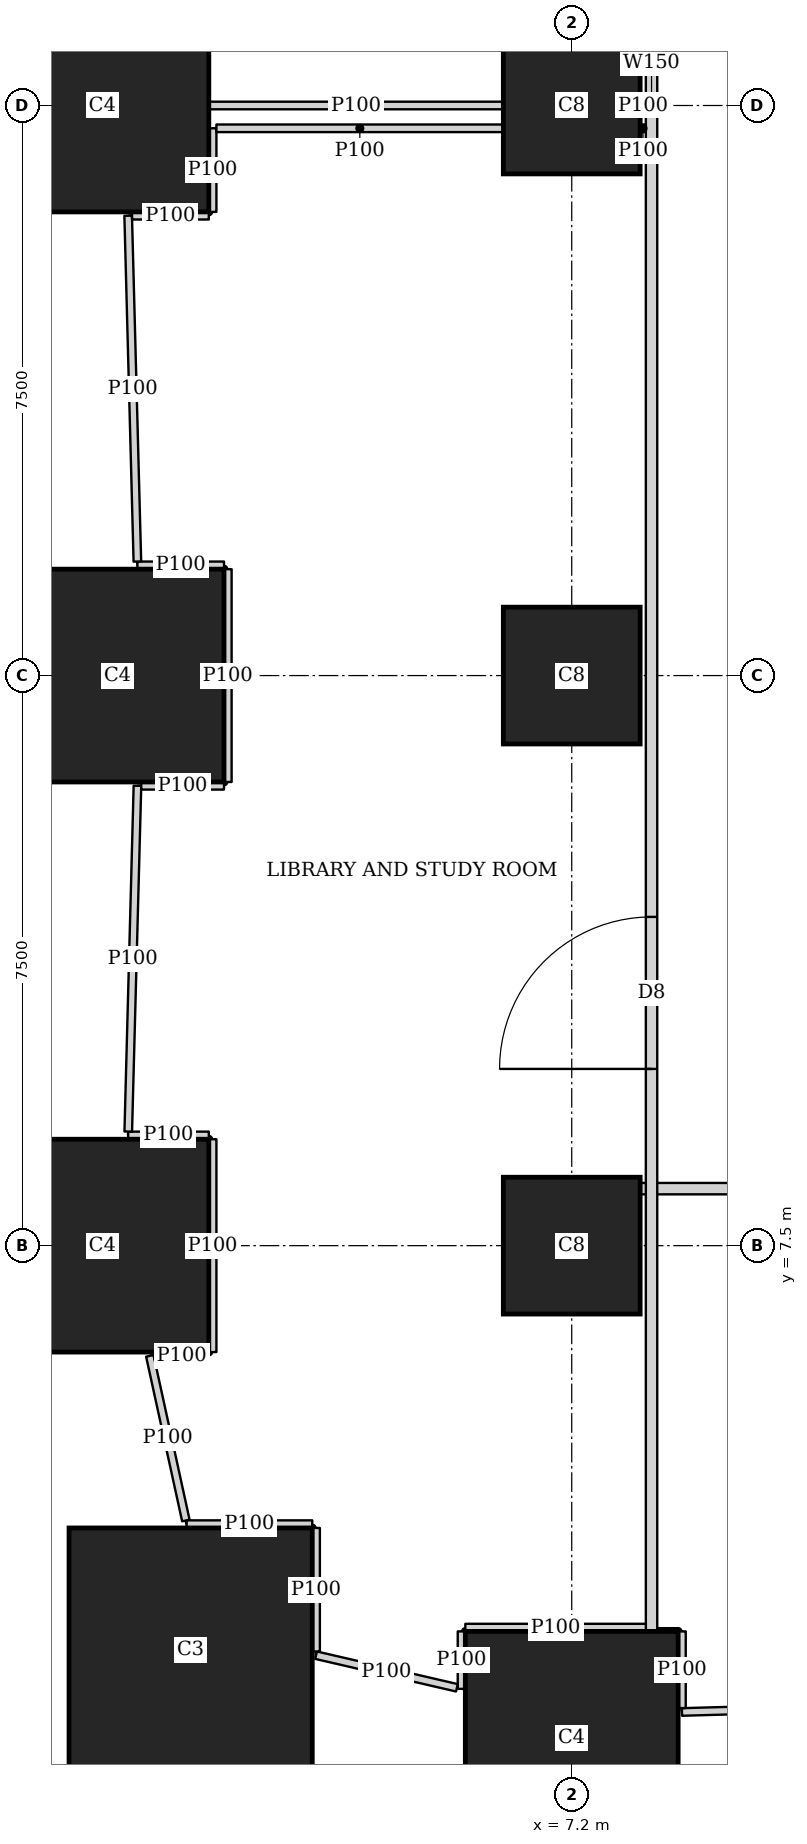
"""IFC4 building model, lengths in metres.
Left out: names, types, materials, properties, quantities, classifications, styles, units other than length and angle.
Written with IfcOpenShell. Run it as: python <this file> out.ifc"""

import sys

from ifc_helpers import new_model, si_unit, direction, frame, frame_2d, origin, origin_2d, place, context, subcontext, project, spatial, rectangle, extrude, element, fill, save


model = new_model("IFC4")
c1 = context("Model", 3, precision=1e-05, world=origin(), true_north=direction((0.0, 1.0)))
c2 = subcontext(c1, "Body", "Model", "MODEL_VIEW")
j1 = project(units=[si_unit("LENGTHUNIT", "METRE"), si_unit("PLANEANGLEUNIT", "RADIAN")], contexts=[c1])
p1 = place(None, origin())
s1 = spatial("IfcSite", under=j1, at=p1, CompositionType="ELEMENT")
p2 = place(p1, origin())
s2 = spatial("IfcBuilding", under=s1, at=p2, CompositionType="ELEMENT")
p3 = place(p2, frame((0.0, 0.0, 72.5)))
s3 = spatial("IfcBuildingStorey", under=s2, at=p3, CompositionType="ELEMENT", Elevation=72.5)
p4 = place(p3, frame((7.2, 1.025, 0.0), z_axis=(0.0, 0.0, 1.0), x_axis=(1.0, 0.0, 0.0)))
e1 = element("IfcColumn", 1, at=p4, inside=s3, PredefinedType="COLUMN", context=c2, shape_type="SweptSolid", body=[
    extrude(rectangle(XDim=2.8, YDim=2.8, at=origin_2d()), origin(), (0.0, 0.0, 1.0), 5.4),
])
p5 = place(p3, frame((2.186, 2.186, 0.0), z_axis=(0.0, 0.0, 1.0), x_axis=(1.0, 0.0, 0.0)))
e2 = element("IfcColumn", 2, at=p5, inside=s3, PredefinedType="COLUMN", context=c2, shape_type="SweptSolid", body=[
    extrude(rectangle(XDim=3.2, YDim=3.2, at=origin_2d()), origin(), (0.0, 0.0, 1.0), 5.4),
])
p6 = place(p3, frame((1.025, 7.5, 0.0), z_axis=(0.0, 0.0, 1.0), x_axis=(1.0, 0.0, 0.0)))
e3 = element("IfcColumn", 3, at=p6, inside=s3, PredefinedType="COLUMN", context=c2, shape_type="SweptSolid", body=[
    extrude(rectangle(XDim=2.8, YDim=2.8, at=origin_2d()), origin(), (0.0, 0.0, 1.0), 5.4),
])
p7 = place(p3, frame((7.2, 7.5, 0.0), z_axis=(0.0, 0.0, 1.0), x_axis=(1.0, 0.0, 0.0)))
e4 = element("IfcColumn", 4, at=p7, inside=s3, PredefinedType="COLUMN", context=c2, shape_type="SweptSolid", body=[
    extrude(rectangle(XDim=1.8, YDim=1.8, at=origin_2d()), origin(), (0.0, 0.0, 1.0), 5.4),
])
p8 = place(p3, frame((1.225, 15.0, 0.0), z_axis=(0.0, 0.0, 1.0), x_axis=(1.0, 0.0, 0.0)))
e5 = element("IfcColumn", 5, at=p8, inside=s3, PredefinedType="COLUMN", context=c2, shape_type="SweptSolid", body=[
    extrude(rectangle(XDim=2.8, YDim=2.8, at=origin_2d()), origin(), (0.0, 0.0, 1.0), 5.4),
])
p9 = place(p3, frame((7.2, 15.0, 0.0), z_axis=(0.0, 0.0, 1.0), x_axis=(1.0, 0.0, 0.0)))
e6 = element("IfcColumn", 6, at=p9, inside=s3, PredefinedType="COLUMN", context=c2, shape_type="SweptSolid", body=[
    extrude(rectangle(XDim=1.8, YDim=1.8, at=origin_2d()), origin(), (0.0, 0.0, 1.0), 5.4),
])
p10 = place(p3, frame((1.025, 22.5, 0.0), z_axis=(0.0, 0.0, 1.0), x_axis=(1.0, 0.0, 0.0)))
e7 = element("IfcColumn", 7, at=p10, inside=s3, PredefinedType="COLUMN", context=c2, shape_type="SweptSolid", body=[
    extrude(rectangle(XDim=2.8, YDim=2.8, at=origin_2d()), origin(), (0.0, 0.0, 1.0), 5.4),
])
p11 = place(p3, frame((7.2, 22.5, 0.0), z_axis=(0.0, 0.0, 1.0), x_axis=(1.0, 0.0, 0.0)))
e8 = element("IfcColumn", 8, at=p11, inside=s3, PredefinedType="COLUMN", context=c2, shape_type="SweptSolid", body=[
    extrude(rectangle(XDim=1.8, YDim=1.8, at=origin_2d()), origin(), (0.0, 0.0, 1.0), 5.4),
])
p12 = place(p3, frame((-0.358, 0.702, 0.0), z_axis=(0.0, 0.0, 1.0), x_axis=(0.707106781187, -0.707106781187, 0.0)))
e9 = element("IfcWall", 9, at=p12, inside=s3, PredefinedType="SOLIDWALL", context=c2, shape_type="SweptSolid", body=[
    extrude(rectangle(XDim=1.499, YDim=0.2, at=frame_2d((0.75, 0.0))), origin(), (0.0, 0.0, 1.0), 5.15),
])
p13 = place(p3, frame((8.25, 2.426, 0.0), z_axis=(0.0, 0.0, 1.0), x_axis=(0.0, 1.0, 0.0)))
e10 = element("IfcWall", 10, at=p13, inside=s3, PredefinedType="SOLIDWALL", context=c2, shape_type="SweptSolid", body=[
    extrude(rectangle(XDim=40.173, YDim=0.15, at=frame_2d((20.086, 0.0))), origin(), (0.0, 0.0, 1.0), 3.55),
])
p14 = place(p13, frame((7.399, 0.0, 0.0)))
e11 = element("IfcOpeningElement", 11, at=p14, cuts=e10, PredefinedType="OPENING", context=c2, shape_type="SweptSolid", body=[
    extrude(rectangle(XDim=2.0, YDim=2.1, at=frame_2d((1.0, 1.05))), frame((0.0, 0.085, 0.0), z_axis=(0.0, -1.0, 0.0), x_axis=(1.0, 0.0, 0.0)), (0.0, 0.0, 1.0), 0.17),
])
p15 = place(p13, frame((31.249, 0.0, 0.0)))
e12 = element("IfcOpeningElement", 12, at=p15, cuts=e10, PredefinedType="OPENING", context=c2, shape_type="SweptSolid", body=[
    extrude(rectangle(XDim=1.0, YDim=2.1, at=frame_2d((0.5, 1.05))), frame((0.0, 0.085, 0.0), z_axis=(0.0, -1.0, 0.0), x_axis=(1.0, 0.0, 0.0)), (0.0, 0.0, 1.0), 0.17),
])
p16 = place(p3, frame((13.499, 8.25, 0.0), z_axis=(0.0, 0.0, 1.0), x_axis=(-1.0, 0.0, 0.0)))
e13 = element("IfcWall", 13, at=p16, inside=s3, PredefinedType="SOLIDWALL", context=c2, shape_type="SweptSolid", body=[
    extrude(rectangle(XDim=5.399, YDim=0.15, at=frame_2d((2.699, 0.0))), origin(), (0.0, 0.0, 1.0), 3.55),
])
p17 = place(p3, frame((2.426, 22.5, 0.0), z_axis=(0.0, 0.0, 1.0), x_axis=(1.0, 0.0, 0.0)))
e14 = element("IfcWall", 14, at=p17, inside=s3, PredefinedType="PARTITIONING", context=c2, shape_type="SweptSolid", body=[
    extrude(rectangle(XDim=3.873, YDim=0.1, at=frame_2d((1.937, 0.0))), origin(), (0.0, 0.0, 1.0), 3.55),
])
p18 = place(p3, frame((8.101, 22.5, 0.0), z_axis=(0.0, 0.0, 1.0), x_axis=(1.0, 0.0, 0.0)))
e15 = element("IfcWall", 15, at=p18, inside=s3, PredefinedType="PARTITIONING", context=c2, shape_type="SweptSolid", body=[
    extrude(rectangle(XDim=0.074, YDim=0.1, at=frame_2d((0.037, 0.0))), origin(), (0.0, 0.0, 1.0), 3.55),
])
p19 = place(p3, frame((12.9, 1.484, 0.0), z_axis=(0.0, 0.0, 1.0), x_axis=(-0.999608911234, -0.027964702423, 0.0)))
e16 = element("IfcWall", 16, at=p19, inside=s3, PredefinedType="PARTITIONING", context=c2, shape_type="SweptSolid", body=[
    extrude(rectangle(XDim=4.252, YDim=0.1, at=frame_2d((2.126, 0.0))), origin(), (0.0, 0.0, 1.0), 3.35),
])
p20 = place(p3, frame((8.65, 1.416, 0.0), z_axis=(0.0, 0.0, 1.0), x_axis=(0.0, 1.0, 0.0)))
e17 = element("IfcWall", 17, at=p20, inside=s3, PredefinedType="PARTITIONING", context=c2, shape_type="SweptSolid", body=[
    extrude(rectangle(XDim=1.009, YDim=0.1, at=frame_2d((0.504, 0.0))), origin(), (0.0, 0.0, 1.0), 3.35),
])
p21 = place(p3, frame((8.175, 2.475, 0.0), z_axis=(0.0, 0.0, 1.0), x_axis=(-1.0, 0.0, 0.0)))
e18 = element("IfcWall", 18, at=p21, inside=s3, PredefinedType="PARTITIONING", context=c2, shape_type="SweptSolid", body=[
    extrude(rectangle(XDim=2.375, YDim=0.1, at=frame_2d((1.188, 0.0))), origin(), (0.0, 0.0, 1.0), 3.35),
])
p22 = place(p3, frame((5.75, 2.425, 0.0), z_axis=(0.0, 0.0, 1.0), x_axis=(0.0, -1.0, 0.0)))
e19 = element("IfcWall", 19, at=p22, inside=s3, PredefinedType="PARTITIONING", context=c2, shape_type="SweptSolid", body=[
    extrude(rectangle(XDim=0.756, YDim=0.1, at=frame_2d((0.378, 0.0))), origin(), (0.0, 0.0, 1.0), 3.35),
])
p23 = place(p3, frame((5.689, 1.683, 0.0), z_axis=(0.0, 0.0, 1.0), x_axis=(-0.974237371414, 0.225525041051, 0.0)))
e20 = element("IfcWall", 20, at=p23, inside=s3, PredefinedType="PARTITIONING", context=c2, shape_type="SweptSolid", body=[
    extrude(rectangle(XDim=1.902, YDim=0.1, at=frame_2d((0.951, 0.0))), origin(), (0.0, 0.0, 1.0), 3.35),
])
p24 = place(p3, frame((3.836, 2.161, 0.0), z_axis=(0.0, 0.0, 1.0), x_axis=(0.0, 1.0, 0.0)))
e21 = element("IfcWall", 21, at=p24, inside=s3, PredefinedType="PARTITIONING", context=c2, shape_type="SweptSolid", body=[
    extrude(rectangle(XDim=1.625, YDim=0.1, at=frame_2d((0.812, 0.0))), origin(), (0.0, 0.0, 1.0), 3.35),
])
p25 = place(p3, frame((3.786, 3.836, 0.0), z_axis=(0.0, 0.0, 1.0), x_axis=(-1.0, 0.0, 0.0)))
e22 = element("IfcWall", 22, at=p25, inside=s3, PredefinedType="PARTITIONING", context=c2, shape_type="SweptSolid", body=[
    extrude(rectangle(XDim=1.653, YDim=0.1, at=frame_2d((0.826, 0.0))), origin(), (0.0, 0.0, 1.0), 3.35),
])
p26 = place(p3, frame((2.123, 3.884, 0.0), z_axis=(0.0, 0.0, 1.0), x_axis=(-0.213828225657, 0.97687127602, 0.0)))
e23 = element("IfcWall", 23, at=p26, inside=s3, PredefinedType="PARTITIONING", context=c2, shape_type="SweptSolid", body=[
    extrude(rectangle(XDim=2.217, YDim=0.1, at=frame_2d((1.109, 0.0))), origin(), (0.0, 0.0, 1.0), 3.35),
])
p27 = place(p3, frame((1.711, 6.05, 0.0), z_axis=(0.0, 0.0, 1.0), x_axis=(1.0, 0.0, 0.0)))
e24 = element("IfcWall", 24, at=p27, inside=s3, PredefinedType="PARTITIONING", context=c2, shape_type="SweptSolid", body=[
    extrude(rectangle(XDim=0.714, YDim=0.1, at=frame_2d((0.357, 0.0))), origin(), (0.0, 0.0, 1.0), 3.35),
])
p28 = place(p3, frame((2.475, 6.1, 0.0), z_axis=(0.0, 0.0, 1.0), x_axis=(0.0, 1.0, 0.0)))
e25 = element("IfcWall", 25, at=p28, inside=s3, PredefinedType="PARTITIONING", context=c2, shape_type="SweptSolid", body=[
    extrude(rectangle(XDim=2.8, YDim=0.1, at=frame_2d((1.4, 0.0))), origin(), (0.0, 0.0, 1.0), 3.35),
])
p29 = place(p3, frame((2.425, 8.95, 0.0), z_axis=(0.0, 0.0, 1.0), x_axis=(-1.0, 0.0, 0.0)))
e26 = element("IfcWall", 26, at=p29, inside=s3, PredefinedType="PARTITIONING", context=c2, shape_type="SweptSolid", body=[
    extrude(rectangle(XDim=1.061, YDim=0.1, at=frame_2d((0.531, 0.0))), origin(), (0.0, 0.0, 1.0), 3.35),
])
p30 = place(p3, frame((1.365, 9.001, 0.0), z_axis=(0.0, 0.0, 1.0), x_axis=(0.026610012446, 0.999645890922, 0.0)))
e27 = element("IfcWall", 27, at=p30, inside=s3, PredefinedType="PARTITIONING", context=c2, shape_type="SweptSolid", body=[
    extrude(rectangle(XDim=4.551, YDim=0.1, at=frame_2d((2.275, 0.0))), origin(), (0.0, 0.0, 1.0), 3.35),
])
p31 = place(p3, frame((1.536, 13.55, 0.0), z_axis=(0.0, 0.0, 1.0), x_axis=(1.0, 0.0, 0.0)))
e28 = element("IfcWall", 28, at=p31, inside=s3, PredefinedType="PARTITIONING", context=c2, shape_type="SweptSolid", body=[
    extrude(rectangle(XDim=1.089, YDim=0.1, at=frame_2d((0.544, 0.0))), origin(), (0.0, 0.0, 1.0), 3.35),
])
p32 = place(p3, frame((2.675, 13.6, 0.0), z_axis=(0.0, 0.0, 1.0), x_axis=(0.0, 1.0, 0.0)))
e29 = element("IfcWall", 29, at=p32, inside=s3, PredefinedType="PARTITIONING", context=c2, shape_type="SweptSolid", body=[
    extrude(rectangle(XDim=2.8, YDim=0.1, at=frame_2d((1.4, 0.0))), origin(), (0.0, 0.0, 1.0), 3.55),
])
p33 = place(p3, frame((2.625, 16.45, 0.0), z_axis=(0.0, 0.0, 1.0), x_axis=(-1.0, 0.0, 0.0)))
e30 = element("IfcWall", 30, at=p33, inside=s3, PredefinedType="PARTITIONING", context=c2, shape_type="SweptSolid", body=[
    extrude(rectangle(XDim=1.139, YDim=0.1, at=frame_2d((0.569, 0.0))), origin(), (0.0, 0.0, 1.0), 3.35),
])
p34 = place(p3, frame((1.485, 16.5, 0.0), z_axis=(0.0, 0.0, 1.0), x_axis=(-0.026604305266, 0.999646042828, 0.0)))
e31 = element("IfcWall", 31, at=p34, inside=s3, PredefinedType="PARTITIONING", context=c2, shape_type="SweptSolid", body=[
    extrude(rectangle(XDim=4.552, YDim=0.1, at=frame_2d((2.276, 0.0))), origin(), (0.0, 0.0, 1.0), 3.35),
])
p35 = place(p3, frame((1.415, 21.05, 0.0), z_axis=(0.0, 0.0, 1.0), x_axis=(1.0, 0.0, 0.0)))
e32 = element("IfcWall", 32, at=p35, inside=s3, PredefinedType="PARTITIONING", context=c2, shape_type="SweptSolid", body=[
    extrude(rectangle(XDim=1.01, YDim=0.1, at=frame_2d((0.505, 0.0))), origin(), (0.0, 0.0, 1.0), 3.35),
])
p36 = place(p3, frame((2.475, 21.1, 0.0), z_axis=(0.0, 0.0, 1.0), x_axis=(0.0, 1.0, 0.0)))
e33 = element("IfcWall", 33, at=p36, inside=s3, PredefinedType="PARTITIONING", context=c2, shape_type="SweptSolid", body=[
    extrude(rectangle(XDim=1.1, YDim=0.1, at=frame_2d((0.55, 0.0))), origin(), (0.0, 0.0, 1.0), 3.55),
])
p37 = place(p3, frame((2.525, 22.2, 0.0), z_axis=(0.0, 0.0, 1.0), x_axis=(1.0, 0.0, 0.0)))
e34 = element("IfcWall", 34, at=p37, inside=s3, PredefinedType="PARTITIONING", context=c2, shape_type="SweptSolid", body=[
    extrude(rectangle(XDim=3.774, YDim=0.1, at=frame_2d((1.887, 0.0))), origin(), (0.0, 0.0, 1.0), 3.55),
])
p38 = place(p3, frame((8.101, 22.2, 0.0), z_axis=(0.0, 0.0, 1.0), x_axis=(1.0, 0.0, 0.0)))
e35 = element("IfcWall", 35, at=p38, inside=s3, PredefinedType="PARTITIONING", context=c2, shape_type="SweptSolid", body=[
    extrude(rectangle(XDim=0.074, YDim=0.1, at=frame_2d((0.037, 0.0))), origin(), (0.0, 0.0, 1.0), 3.55),
])
p39 = place(p14, origin())
e36 = element("IfcDoor", 36, at=p39, inside=s3, OperationType="DOUBLE_DOOR_SINGLE_SWING", PredefinedType="DOOR", context=c2, shape_type="SweptSolid", body=[
    extrude(rectangle(XDim=2.0, YDim=2.1, at=frame_2d((1.0, 1.05))), frame((0.0, 0.025, 0.0), z_axis=(0.0, -1.0, 0.0), x_axis=(1.0, 0.0, 0.0)), (0.0, 0.0, 1.0), 0.05),
])
fill(e11, e36)
save(model, sys.argv[1])
